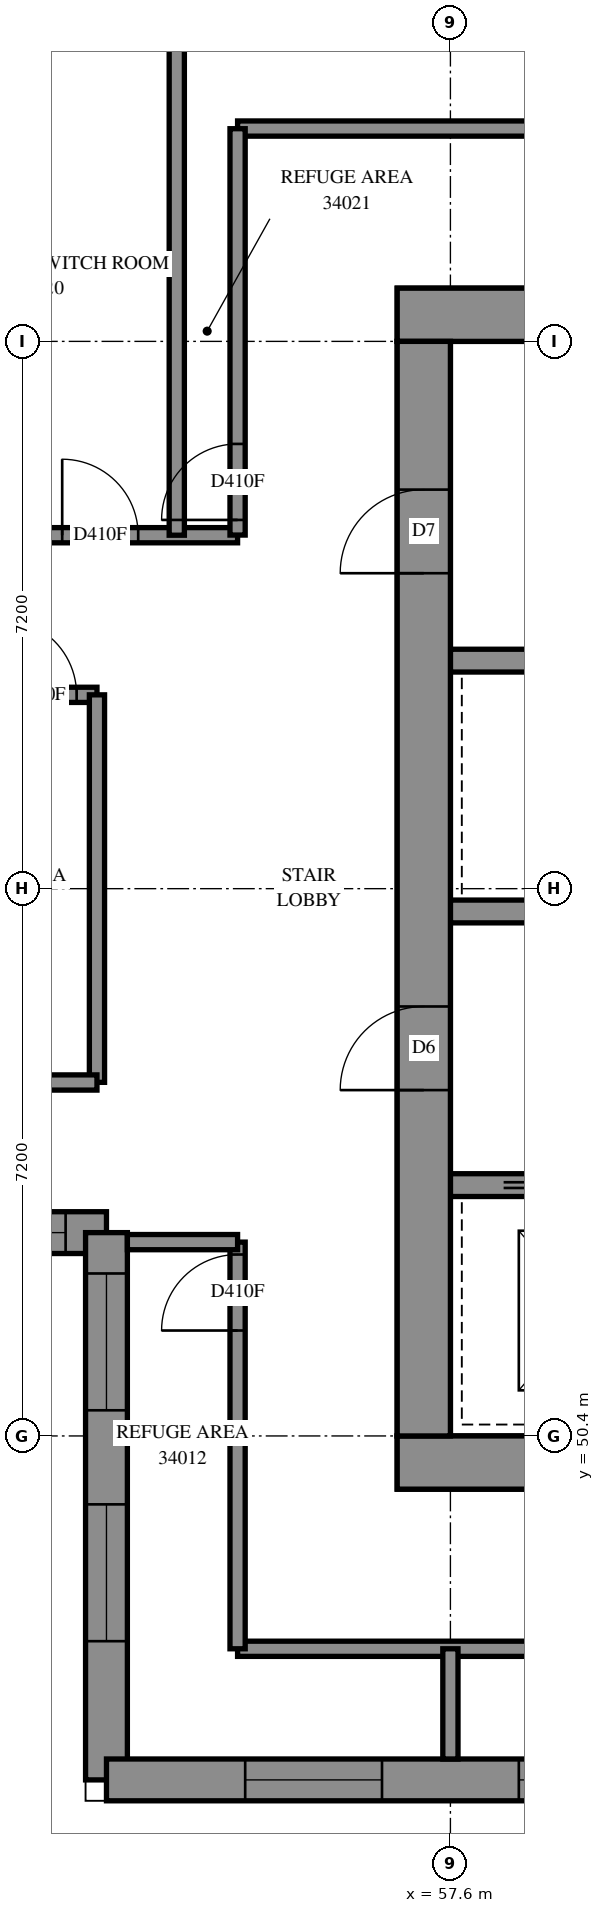
"""IFC4 building model, lengths in metres.
Left out: names, types, materials, properties, quantities, classifications, styles, units other than length and angle.
Written with IfcOpenShell. Run it as: python <this file> out.ifc"""

import sys

from ifc_helpers import new_model, si_unit, direction, frame, frame_2d, origin, place, context, subcontext, project, spatial, polyline, rectangle, outline, extrude, element, fill, save


model = new_model("IFC4")
c1 = context("Model", 3, precision=1e-05, world=origin(), true_north=direction((0.0, 1.0)))
c2 = subcontext(c1, "Body", "Model", "MODEL_VIEW")
j1 = project(units=[si_unit("LENGTHUNIT", "METRE"), si_unit("PLANEANGLEUNIT", "RADIAN")], contexts=[c1])
p1 = place(None, origin())
s1 = spatial("IfcSite", under=j1, at=p1, CompositionType="ELEMENT")
p2 = place(p1, origin())
s2 = spatial("IfcBuilding", under=s1, at=p2, CompositionType="ELEMENT")
p3 = place(p2, frame((0.0, 0.0, 126.2)))
s3 = spatial("IfcBuildingStorey", under=s2, at=p3, CompositionType="ELEMENT", Elevation=126.2)
p4 = place(p3, frame((56.9, 50.05, -0.3), z_axis=(0.0, 0.0, 1.0), x_axis=(1.0, 0.0, 0.0)))
e1 = element("IfcWall", 1, at=p4, inside=s3, PredefinedType="SHEAR", context=c2, shape_type="SweptSolid", body=[
    extrude(rectangle(XDim=15.8, YDim=0.7, at=frame_2d((7.9, 0.0))), origin(), (0.0, 0.0, 1.0), 4.3),
])
p5 = place(p3, frame((56.9, 65.15, -0.3), z_axis=(0.0, 0.0, 1.0), x_axis=(1.0, 0.0, 0.0)))
e2 = element("IfcWall", 2, at=p5, inside=s3, PredefinedType="SHEAR", context=c2, shape_type="SweptSolid", body=[
    extrude(rectangle(XDim=15.8, YDim=0.7, at=frame_2d((7.9, 0.0))), origin(), (0.0, 0.0, 1.0), 4.3),
])
p6 = place(p5, frame((10.7, 0.0, 0.3)))
e3 = element("IfcOpeningElement", 3, at=p6, cuts=e2, PredefinedType="OPENING", context=c2, shape_type="SweptSolid", body=[
    extrude(rectangle(XDim=0.8, YDim=2.1, at=frame_2d((0.4, 1.05))), frame((0.0, 0.36, 0.0), z_axis=(0.0, -1.0, 0.0), x_axis=(1.0, 0.0, 0.0)), (0.0, 0.0, 1.0), 0.72),
])
p7 = place(p3, frame((57.25, 50.4, -0.3), z_axis=(0.0, 0.0, 1.0), x_axis=(0.0, 1.0, 0.0)))
e4 = element("IfcWall", 4, at=p7, inside=s3, PredefinedType="SHEAR", context=c2, shape_type="SweptSolid", body=[
    extrude(rectangle(XDim=14.4, YDim=0.7, at=frame_2d((7.2, 0.0))), origin(), (0.0, 0.0, 1.0), 4.3),
])
p8 = place(p7, frame((4.55, 0.0, 0.3)))
e5 = element("IfcOpeningElement", 5, at=p8, cuts=e4, PredefinedType="OPENING", context=c2, shape_type="SweptSolid", body=[
    extrude(rectangle(XDim=1.1, YDim=2.1, at=frame_2d((0.55, 1.05))), frame((0.0, 0.36, 0.0), z_axis=(0.0, -1.0, 0.0), x_axis=(1.0, 0.0, 0.0)), (0.0, 0.0, 1.0), 0.72),
])
p9 = place(p7, frame((11.35, 0.0, 0.3)))
e6 = element("IfcOpeningElement", 6, at=p9, cuts=e4, PredefinedType="OPENING", context=c2, shape_type="SweptSolid", body=[
    extrude(rectangle(XDim=1.1, YDim=2.1, at=frame_2d((0.55, 1.05))), frame((0.0, 0.36, 0.0), z_axis=(0.0, -1.0, 0.0), x_axis=(1.0, 0.0, 0.0)), (0.0, 0.0, 1.0), 0.72),
])
p10 = place(p3, frame((57.6, 53.7, 0.0), z_axis=(0.0, 0.0, 1.0), x_axis=(1.0, 0.0, 0.0)))
e7 = element("IfcWall", 7, at=p10, inside=s3, PredefinedType="SOLIDWALL", context=c2, shape_type="SweptSolid", body=[
    extrude(rectangle(XDim=14.4, YDim=0.3, at=frame_2d((7.2, 0.0))), origin(), (0.0, 0.0, 1.0), 4.7),
])
p11 = place(p10, frame((1.25, 0.0, 0.0)))
e8 = element("IfcOpeningElement", 8, at=p11, cuts=e7, PredefinedType="OPENING", context=c2, shape_type="SweptSolid", body=[
    extrude(rectangle(XDim=1.1, YDim=2.1, at=frame_2d((0.55, 1.05))), frame((0.0, 0.16, 0.0), z_axis=(0.0, -1.0, 0.0), x_axis=(1.0, 0.0, 0.0)), (0.0, 0.0, 1.0), 0.32),
])
p12 = place(p10, frame((4.85, 0.0, 0.0)))
e9 = element("IfcOpeningElement", 9, at=p12, cuts=e7, PredefinedType="OPENING", context=c2, shape_type="SweptSolid", body=[
    extrude(rectangle(XDim=1.1, YDim=2.1, at=frame_2d((0.55, 1.05))), frame((0.0, 0.16, 0.0), z_axis=(0.0, -1.0, 0.0), x_axis=(1.0, 0.0, 0.0)), (0.0, 0.0, 1.0), 0.32),
])
p13 = place(p10, frame((8.45, 0.0, 0.0)))
e10 = element("IfcOpeningElement", 10, at=p13, cuts=e7, PredefinedType="OPENING", context=c2, shape_type="SweptSolid", body=[
    extrude(rectangle(XDim=1.1, YDim=2.1, at=frame_2d((0.55, 1.05))), frame((0.0, 0.16, 0.0), z_axis=(0.0, -1.0, 0.0), x_axis=(1.0, 0.0, 0.0)), (0.0, 0.0, 1.0), 0.32),
])
p14 = place(p10, frame((12.05, 0.0, 0.0)))
e11 = element("IfcOpeningElement", 11, at=p14, cuts=e7, PredefinedType="OPENING", context=c2, shape_type="SweptSolid", body=[
    extrude(rectangle(XDim=1.1, YDim=2.1, at=frame_2d((0.55, 1.05))), frame((0.0, 0.16, 0.0), z_axis=(0.0, -1.0, 0.0), x_axis=(1.0, 0.0, 0.0)), (0.0, 0.0, 1.0), 0.32),
])
p15 = place(p3, frame((57.6, 57.3, 0.0), z_axis=(0.0, 0.0, 1.0), x_axis=(1.0, 0.0, 0.0)))
e12 = element("IfcWall", 12, at=p15, inside=s3, PredefinedType="SOLIDWALL", context=c2, shape_type="SweptSolid", body=[
    extrude(rectangle(XDim=14.4, YDim=0.3, at=frame_2d((7.2, 0.0))), origin(), (0.0, 0.0, 1.0), 4.7),
])
p16 = place(p15, frame((12.05, 0.0, 0.0)))
e13 = element("IfcOpeningElement", 13, at=p16, cuts=e12, PredefinedType="OPENING", context=c2, shape_type="SweptSolid", body=[
    extrude(rectangle(XDim=1.1, YDim=2.1, at=frame_2d((0.55, 1.05))), frame((0.0, 0.16, 0.0), z_axis=(0.0, -1.0, 0.0), x_axis=(1.0, 0.0, 0.0)), (0.0, 0.0, 1.0), 0.32),
])
p17 = place(p3, frame((57.6, 60.6, 0.0), z_axis=(0.0, 0.0, 1.0), x_axis=(1.0, 0.0, 0.0)))
e14 = element("IfcWall", 14, at=p17, inside=s3, PredefinedType="SOLIDWALL", context=c2, shape_type="SweptSolid", body=[
    extrude(rectangle(XDim=7.2, YDim=0.3, at=frame_2d((3.6, 0.0))), origin(), (0.0, 0.0, 1.0), 4.7),
])
p18 = place(p3, frame((45.875, 53.075, 0.0), z_axis=(0.0, 0.0, 1.0), x_axis=(1.0, 0.0, 0.0)))
e15 = element("IfcWall", 15, at=p18, inside=s3, PredefinedType="SOLIDWALL", context=c2, shape_type="SweptSolid", body=[
    extrude(outline(polyline([(-0.275, -0.275), (6.925, -0.275), (7.475, 0.275), (0.275, 0.275), (-0.275, -0.275)])), origin(), (0.0, 0.0, 1.0), 4.7),
])
p19 = place(p18, frame((1.825, 0.0, 0.9)))
e16 = element("IfcOpeningElement", 16, at=p19, cuts=e15, PredefinedType="OPENING", context=c2, shape_type="SweptSolid", body=[
    extrude(rectangle(XDim=1.8, YDim=2.4, at=frame_2d((0.9, 1.2))), frame((0.0, 0.285, 0.0), z_axis=(0.0, -1.0, 0.0), x_axis=(1.0, 0.0, 0.0)), (0.0, 0.0, 1.0), 0.57),
])
p20 = place(p18, frame((4.862, 0.0, 0.9)))
e17 = element("IfcOpeningElement", 17, at=p20, cuts=e15, PredefinedType="OPENING", context=c2, shape_type="SweptSolid", body=[
    extrude(rectangle(XDim=1.8, YDim=2.4, at=frame_2d((0.9, 1.2))), frame((0.0, 0.285, 0.0), z_axis=(0.0, -1.0, 0.0), x_axis=(1.0, 0.0, 0.0)), (0.0, 0.0, 1.0), 0.57),
])
p21 = place(p3, frame((53.075, 53.075, 0.0), z_axis=(0.0, 0.0, 1.0), x_axis=(0.0, -1.0, 0.0)))
e18 = element("IfcWall", 18, at=p21, inside=s3, PredefinedType="SOLIDWALL", context=c2, shape_type="SweptSolid", body=[
    extrude(outline(polyline([(0.275, -0.275), (7.475, -0.275), (6.925, 0.275), (-0.275, 0.275), (0.275, -0.275)])), origin(), (0.0, 0.0, 1.0), 4.7),
])
p22 = place(p21, frame((0.537, 0.0, 0.9)))
e19 = element("IfcOpeningElement", 19, at=p22, cuts=e18, PredefinedType="OPENING", context=c2, shape_type="SweptSolid", body=[
    extrude(rectangle(XDim=1.8, YDim=2.4, at=frame_2d((0.9, 1.2))), frame((0.0, 0.285, 0.0), z_axis=(0.0, -1.0, 0.0), x_axis=(1.0, 0.0, 0.0)), (0.0, 0.0, 1.0), 0.57),
])
p23 = place(p21, frame((3.575, 0.0, 0.9)))
e20 = element("IfcOpeningElement", 20, at=p23, cuts=e18, PredefinedType="OPENING", context=c2, shape_type="SweptSolid", body=[
    extrude(rectangle(XDim=1.8, YDim=2.4, at=frame_2d((0.9, 1.2))), frame((0.0, 0.285, 0.0), z_axis=(0.0, -1.0, 0.0), x_axis=(1.0, 0.0, 0.0)), (0.0, 0.0, 1.0), 0.57),
])
p24 = place(p3, frame((53.075, 45.875, 0.0), z_axis=(0.0, 0.0, 1.0), x_axis=(1.0, 0.0, 0.0)))
e21 = element("IfcWall", 21, at=p24, inside=s3, PredefinedType="SOLIDWALL", context=c2, shape_type="SweptSolid", body=[
    extrude(outline(polyline([(-0.275, -0.275), (25.372, -0.275), (25.6, 0.275), (0.275, 0.275), (-0.275, -0.275)])), origin(), (0.0, 0.0, 1.0), 4.7),
])
p25 = place(p24, frame((1.825, 0.0, 0.9)))
e22 = element("IfcOpeningElement", 22, at=p25, cuts=e21, PredefinedType="OPENING", context=c2, shape_type="SweptSolid", body=[
    extrude(rectangle(XDim=1.8, YDim=2.4, at=frame_2d((0.9, 1.2))), frame((0.0, 0.285, 0.0), z_axis=(0.0, -1.0, 0.0), x_axis=(1.0, 0.0, 0.0)), (0.0, 0.0, 1.0), 0.57),
])
p26 = place(p24, frame((5.425, 0.0, 0.9)))
e23 = element("IfcOpeningElement", 23, at=p26, cuts=e21, PredefinedType="OPENING", context=c2, shape_type="SweptSolid", body=[
    extrude(rectangle(XDim=1.8, YDim=2.4, at=frame_2d((0.9, 1.2))), frame((0.0, 0.285, 0.0), z_axis=(0.0, -1.0, 0.0), x_axis=(1.0, 0.0, 0.0)), (0.0, 0.0, 1.0), 0.57),
])
p27 = place(p24, frame((9.025, 0.0, 0.9)))
e24 = element("IfcOpeningElement", 24, at=p27, cuts=e21, PredefinedType="OPENING", context=c2, shape_type="SweptSolid", body=[
    extrude(rectangle(XDim=1.8, YDim=2.4, at=frame_2d((0.9, 1.2))), frame((0.0, 0.285, 0.0), z_axis=(0.0, -1.0, 0.0), x_axis=(1.0, 0.0, 0.0)), (0.0, 0.0, 1.0), 0.57),
])
p28 = place(p24, frame((12.625, 0.0, 0.9)))
e25 = element("IfcOpeningElement", 25, at=p28, cuts=e21, PredefinedType="OPENING", context=c2, shape_type="SweptSolid", body=[
    extrude(rectangle(XDim=1.8, YDim=2.4, at=frame_2d((0.9, 1.2))), frame((0.0, 0.285, 0.0), z_axis=(0.0, -1.0, 0.0), x_axis=(1.0, 0.0, 0.0)), (0.0, 0.0, 1.0), 0.57),
])
p29 = place(p24, frame((16.225, 0.0, 0.9)))
e26 = element("IfcOpeningElement", 26, at=p29, cuts=e21, PredefinedType="OPENING", context=c2, shape_type="SweptSolid", body=[
    extrude(rectangle(XDim=1.8, YDim=2.4, at=frame_2d((0.9, 1.2))), frame((0.0, 0.285, 0.0), z_axis=(0.0, -1.0, 0.0), x_axis=(1.0, 0.0, 0.0)), (0.0, 0.0, 1.0), 0.57),
])
p30 = place(p24, frame((19.825, 0.0, 0.9)))
e27 = element("IfcOpeningElement", 27, at=p30, cuts=e21, PredefinedType="OPENING", context=c2, shape_type="SweptSolid", body=[
    extrude(rectangle(XDim=1.8, YDim=2.4, at=frame_2d((0.9, 1.2))), frame((0.0, 0.285, 0.0), z_axis=(0.0, -1.0, 0.0), x_axis=(1.0, 0.0, 0.0)), (0.0, 0.0, 1.0), 0.57),
])
p31 = place(p24, frame((23.006, 0.0, 0.9)))
e28 = element("IfcOpeningElement", 28, at=p31, cuts=e21, PredefinedType="OPENING", context=c2, shape_type="SweptSolid", body=[
    extrude(rectangle(XDim=1.8, YDim=2.4, at=frame_2d((0.9, 1.2))), frame((0.0, 0.285, 0.0), z_axis=(0.0, -1.0, 0.0), x_axis=(1.0, 0.0, 0.0)), (0.0, 0.0, 1.0), 0.57),
])
p32 = place(p3, frame((54.8, 67.6, 0.0), z_axis=(0.0, 0.0, 1.0), x_axis=(1.0, 0.0, 0.0)))
e29 = element("IfcWall", 29, at=p32, inside=s3, PredefinedType="PARTITIONING", context=c2, shape_type="SweptSolid", body=[
    extrude(rectangle(XDim=19.998, YDim=0.2, at=frame_2d((9.999, 0.0))), origin(), (0.0, 0.0, 1.0), 4.7),
])
p33 = place(p32, frame((8.738, 0.0, 0.0)))
e30 = element("IfcOpeningElement", 30, at=p33, cuts=e29, PredefinedType="OPENING", context=c2, shape_type="SweptSolid", body=[
    extrude(rectangle(XDim=1.0, YDim=2.1, at=frame_2d((0.5, 1.05))), frame((0.0, 0.11, 0.0), z_axis=(0.0, -1.0, 0.0), x_axis=(1.0, 0.0, 0.0)), (0.0, 0.0, 1.0), 0.22),
])
p34 = place(p3, frame((54.8, 47.6, 0.0), z_axis=(0.0, 0.0, 1.0), x_axis=(1.0, 0.0, 0.0)))
e31 = element("IfcWall", 31, at=p34, inside=s3, PredefinedType="PARTITIONING", context=c2, shape_type="SweptSolid", body=[
    extrude(rectangle(XDim=19.384, YDim=0.2, at=frame_2d((9.692, 0.0))), origin(), (0.0, 0.0, 1.0), 4.7),
])
p35 = place(p34, frame((12.156, 0.0, 0.0)))
e32 = element("IfcOpeningElement", 32, at=p35, cuts=e31, PredefinedType="OPENING", context=c2, shape_type="SweptSolid", body=[
    extrude(rectangle(XDim=1.0, YDim=2.1, at=frame_2d((0.5, 1.05))), frame((0.0, 0.11, 0.0), z_axis=(0.0, -1.0, 0.0), x_axis=(1.0, 0.0, 0.0)), (0.0, 0.0, 1.0), 0.22),
])
p36 = place(p3, frame((40.652, 62.25, 0.0), z_axis=(0.0, 0.0, 1.0), x_axis=(1.0, 0.0, 0.0)))
e33 = element("IfcWall", 33, at=p36, inside=s3, PredefinedType="PARTITIONING", context=c2, shape_type="SweptSolid", body=[
    extrude(rectangle(XDim=14.148, YDim=0.2, at=frame_2d((7.074, 0.0))), origin(), (0.0, 0.0, 1.0), 4.7),
])
p37 = place(p36, frame((6.41, 0.0, 0.0)))
e34 = element("IfcOpeningElement", 34, at=p37, cuts=e33, PredefinedType="OPENING", context=c2, shape_type="SweptSolid", body=[
    extrude(rectangle(XDim=1.0, YDim=2.1, at=frame_2d((0.5, 1.05))), frame((0.0, 0.11, 0.0), z_axis=(0.0, -1.0, 0.0), x_axis=(1.0, 0.0, 0.0)), (0.0, 0.0, 1.0), 0.22),
])
p38 = place(p36, frame((11.841, 0.0, 0.0)))
e35 = element("IfcOpeningElement", 35, at=p38, cuts=e33, PredefinedType="OPENING", context=c2, shape_type="SweptSolid", body=[
    extrude(rectangle(XDim=1.0, YDim=2.1, at=frame_2d((0.5, 1.05))), frame((0.0, 0.11, 0.0), z_axis=(0.0, -1.0, 0.0), x_axis=(1.0, 0.0, 0.0)), (0.0, 0.0, 1.0), 0.22),
])
p39 = place(p3, frame((46.15, 60.15, 0.0), z_axis=(0.0, 0.0, 1.0), x_axis=(1.0, 0.0, 0.0)))
e36 = element("IfcWall", 36, at=p39, inside=s3, PredefinedType="PARTITIONING", context=c2, shape_type="SweptSolid", body=[
    extrude(rectangle(XDim=6.8, YDim=0.2, at=frame_2d((3.4, 0.0))), origin(), (0.0, 0.0, 1.0), 4.7),
])
p40 = place(p39, frame((0.796, 0.0, 0.0)))
e37 = element("IfcOpeningElement", 37, at=p40, cuts=e36, PredefinedType="OPENING", context=c2, shape_type="SweptSolid", body=[
    extrude(rectangle(XDim=1.0, YDim=2.1, at=frame_2d((0.5, 1.05))), frame((0.0, 0.11, 0.0), z_axis=(0.0, -1.0, 0.0), x_axis=(1.0, 0.0, 0.0)), (0.0, 0.0, 1.0), 0.22),
])
p41 = place(p39, frame((5.532, 0.0, 0.0)))
e38 = element("IfcOpeningElement", 38, at=p41, cuts=e36, PredefinedType="OPENING", context=c2, shape_type="SweptSolid", body=[
    extrude(rectangle(XDim=1.0, YDim=2.1, at=frame_2d((0.5, 1.05))), frame((0.0, 0.11, 0.0), z_axis=(0.0, -1.0, 0.0), x_axis=(1.0, 0.0, 0.0)), (0.0, 0.0, 1.0), 0.22),
])
p42 = place(p3, frame((54.0, 62.25, 0.0), z_axis=(0.0, 0.0, 1.0), x_axis=(0.0, 1.0, 0.0)))
e39 = element("IfcWall", 39, at=p42, inside=s3, PredefinedType="PARTITIONING", context=c2, shape_type="SweptSolid", body=[
    extrude(rectangle(XDim=6.8, YDim=0.2, at=frame_2d((3.4, 0.0))), origin(), (0.0, 0.0, 1.0), 4.7),
])
p43 = place(p3, frame((54.8, 47.6, 0.0), z_axis=(0.0, 0.0, 1.0), x_axis=(0.0, 1.0, 0.0)))
e40 = element("IfcWall", 40, at=p43, inside=s3, PredefinedType="PARTITIONING", context=c2, shape_type="SweptSolid", body=[
    extrude(rectangle(XDim=5.35, YDim=0.2, at=frame_2d((2.675, 0.0))), origin(), (0.0, 0.0, 1.0), 4.7),
])
p44 = place(p43, frame((4.187, 0.0, 0.0)))
e41 = element("IfcOpeningElement", 41, at=p44, cuts=e40, PredefinedType="OPENING", context=c2, shape_type="SweptSolid", body=[
    extrude(rectangle(XDim=1.0, YDim=2.1, at=frame_2d((0.5, 1.05))), frame((0.0, 0.11, 0.0), z_axis=(0.0, -1.0, 0.0), x_axis=(1.0, 0.0, 0.0)), (0.0, 0.0, 1.0), 0.22),
])
p45 = place(p3, frame((54.8, 62.252, 0.0), z_axis=(0.0, 0.0, 1.0), x_axis=(0.0, 1.0, 0.0)))
e42 = element("IfcWall", 42, at=p45, inside=s3, PredefinedType="PARTITIONING", context=c2, shape_type="SweptSolid", body=[
    extrude(rectangle(XDim=5.346, YDim=0.2, at=frame_2d((2.673, 0.0))), origin(), (0.0, 0.0, 1.0), 4.7),
])
p46 = place(p45, frame((0.199, 0.0, 0.0)))
e43 = element("IfcOpeningElement", 43, at=p46, cuts=e42, PredefinedType="OPENING", context=c2, shape_type="SweptSolid", body=[
    extrude(rectangle(XDim=1.0, YDim=2.1, at=frame_2d((0.5, 1.05))), frame((0.0, 0.11, 0.0), z_axis=(0.0, -1.0, 0.0), x_axis=(1.0, 0.0, 0.0)), (0.0, 0.0, 1.0), 0.22),
])
p47 = place(p3, frame((52.95, 55.052, 0.0), z_axis=(0.0, 0.0, 1.0), x_axis=(0.0, 1.0, 0.0)))
e44 = element("IfcWall", 44, at=p47, inside=s3, PredefinedType="PARTITIONING", context=c2, shape_type="SweptSolid", body=[
    extrude(rectangle(XDim=5.098, YDim=0.2, at=frame_2d((2.549, 0.0))), origin(), (0.0, 0.0, 1.0), 4.7),
])
p48 = place(p3, frame((50.4, 55.05, 0.0), z_axis=(0.0, 0.0, 1.0), x_axis=(1.0, 0.0, 0.0)))
e45 = element("IfcWall", 45, at=p48, inside=s3, PredefinedType="PARTITIONING", context=c2, shape_type="SweptSolid", body=[
    extrude(rectangle(XDim=2.55, YDim=0.2, at=frame_2d((1.275, 0.0))), origin(), (0.0, 0.0, 1.0), 4.7),
])
for number, where, z_axis, x_axis in (
    (46, (53.35, 52.95, 0.0), (0.0, 0.0, 1.0), (1.0, 0.0, 0.0)),
    (47, (57.6, 46.15, 0.0), (0.0, 0.0, 1.0), (0.0, 1.0, 0.0)),
):
    element("IfcWall", number, at=place(p3, frame(where, z_axis=z_axis, x_axis=x_axis)), inside=s3, PredefinedType="PARTITIONING", context=c2, shape_type="SweptSolid", body=[
        extrude(rectangle(XDim=1.45, YDim=0.2, at=frame_2d((0.725, 0.0))), origin(), (0.0, 0.0, 1.0), 4.7),
    ])
p49 = place(p20, origin())
e48 = element("IfcWindow", 48, at=p49, inside=s3, PartitioningType="SINGLE_PANEL", PredefinedType="WINDOW", context=c2, shape_type="SweptSolid", body=[
    extrude(rectangle(XDim=1.8, YDim=2.4, at=frame_2d((0.9, 1.2))), frame((0.0, 0.155, 0.0), z_axis=(0.0, -1.0, 0.0), x_axis=(1.0, 0.0, 0.0)), (0.0, 0.0, 1.0), 0.06),
])
fill(e17, e48)
p50 = place(p22, origin())
e49 = element("IfcWindow", 49, at=p50, inside=s3, PartitioningType="SINGLE_PANEL", PredefinedType="WINDOW", context=c2, shape_type="SweptSolid", body=[
    extrude(rectangle(XDim=1.8, YDim=2.4, at=frame_2d((0.9, 1.2))), frame((0.0, 0.155, 0.0), z_axis=(0.0, -1.0, 0.0), x_axis=(1.0, 0.0, 0.0)), (0.0, 0.0, 1.0), 0.06),
])
fill(e19, e49)
p51 = place(p23, origin())
e50 = element("IfcWindow", 50, at=p51, inside=s3, PartitioningType="SINGLE_PANEL", PredefinedType="WINDOW", context=c2, shape_type="SweptSolid", body=[
    extrude(rectangle(XDim=1.8, YDim=2.4, at=frame_2d((0.9, 1.2))), frame((0.0, 0.155, 0.0), z_axis=(0.0, -1.0, 0.0), x_axis=(1.0, 0.0, 0.0)), (0.0, 0.0, 1.0), 0.06),
])
fill(e20, e50)
p52 = place(p25, origin())
e51 = element("IfcWindow", 51, at=p52, inside=s3, PartitioningType="SINGLE_PANEL", PredefinedType="WINDOW", context=c2, shape_type="SweptSolid", body=[
    extrude(rectangle(XDim=1.8, YDim=2.4, at=frame_2d((0.9, 1.2))), frame((0.0, 0.155, 0.0), z_axis=(0.0, -1.0, 0.0), x_axis=(1.0, 0.0, 0.0)), (0.0, 0.0, 1.0), 0.06),
])
fill(e22, e51)
p53 = place(p26, origin())
e52 = element("IfcWindow", 52, at=p53, inside=s3, PartitioningType="SINGLE_PANEL", PredefinedType="WINDOW", context=c2, shape_type="SweptSolid", body=[
    extrude(rectangle(XDim=1.8, YDim=2.4, at=frame_2d((0.9, 1.2))), frame((0.0, 0.155, 0.0), z_axis=(0.0, -1.0, 0.0), x_axis=(1.0, 0.0, 0.0)), (0.0, 0.0, 1.0), 0.06),
])
fill(e23, e52)
p54 = place(p8, origin())
e53 = element("IfcDoor", 53, at=p54, inside=s3, OperationType="DOUBLE_DOOR_SINGLE_SWING", PredefinedType="DOOR", context=c2, shape_type="SweptSolid", body=[
    extrude(rectangle(XDim=1.1, YDim=2.1, at=frame_2d((0.55, 1.05))), frame((0.0, 0.025, 0.0), z_axis=(0.0, -1.0, 0.0), x_axis=(1.0, 0.0, 0.0)), (0.0, 0.0, 1.0), 0.05),
])
fill(e5, e53)
p55 = place(p9, origin())
e54 = element("IfcDoor", 54, at=p55, inside=s3, OperationType="SINGLE_SWING_LEFT", PredefinedType="DOOR", context=c2, shape_type="SweptSolid", body=[
    extrude(rectangle(XDim=1.1, YDim=2.1, at=frame_2d((0.55, 1.05))), frame((0.0, 0.025, 0.0), z_axis=(0.0, -1.0, 0.0), x_axis=(1.0, 0.0, 0.0)), (0.0, 0.0, 1.0), 0.05),
])
fill(e6, e54)
p56 = place(p44, origin())
e55 = element("IfcDoor", 55, at=p56, inside=s3, OperationType="SINGLE_SWING_RIGHT", PredefinedType="DOOR", context=c2, shape_type="SweptSolid", body=[
    extrude(rectangle(XDim=1.0, YDim=2.1, at=frame_2d((0.5, 1.05))), frame((0.0, 0.025, 0.0), z_axis=(0.0, -1.0, 0.0), x_axis=(1.0, 0.0, 0.0)), (0.0, 0.0, 1.0), 0.05),
])
fill(e41, e55)
p57 = place(p41, origin())
e56 = element("IfcDoor", 56, at=p57, inside=s3, OperationType="SINGLE_SWING_LEFT", PredefinedType="DOOR", context=c2, shape_type="SweptSolid", body=[
    extrude(rectangle(XDim=1.0, YDim=2.1, at=frame_2d((0.5, 1.05))), frame((0.0, 0.025, 0.0), z_axis=(0.0, -1.0, 0.0), x_axis=(1.0, 0.0, 0.0)), (0.0, 0.0, 1.0), 0.05),
])
fill(e38, e56)
p58 = place(p38, origin())
e57 = element("IfcDoor", 57, at=p58, inside=s3, OperationType="SINGLE_SWING_RIGHT", PredefinedType="DOOR", context=c2, shape_type="SweptSolid", body=[
    extrude(rectangle(XDim=1.0, YDim=2.1, at=frame_2d((0.5, 1.05))), frame((0.0, 0.025, 0.0), z_axis=(0.0, -1.0, 0.0), x_axis=(1.0, 0.0, 0.0)), (0.0, 0.0, 1.0), 0.05),
])
fill(e35, e57)
p59 = place(p46, origin())
e58 = element("IfcDoor", 58, at=p59, inside=s3, OperationType="SINGLE_SWING_LEFT", PredefinedType="DOOR", context=c2, shape_type="SweptSolid", body=[
    extrude(rectangle(XDim=1.0, YDim=2.1, at=frame_2d((0.5, 1.05))), frame((0.0, 0.025, 0.0), z_axis=(0.0, -1.0, 0.0), x_axis=(1.0, 0.0, 0.0)), (0.0, 0.0, 1.0), 0.05),
])
fill(e43, e58)
save(model, sys.argv[1])
